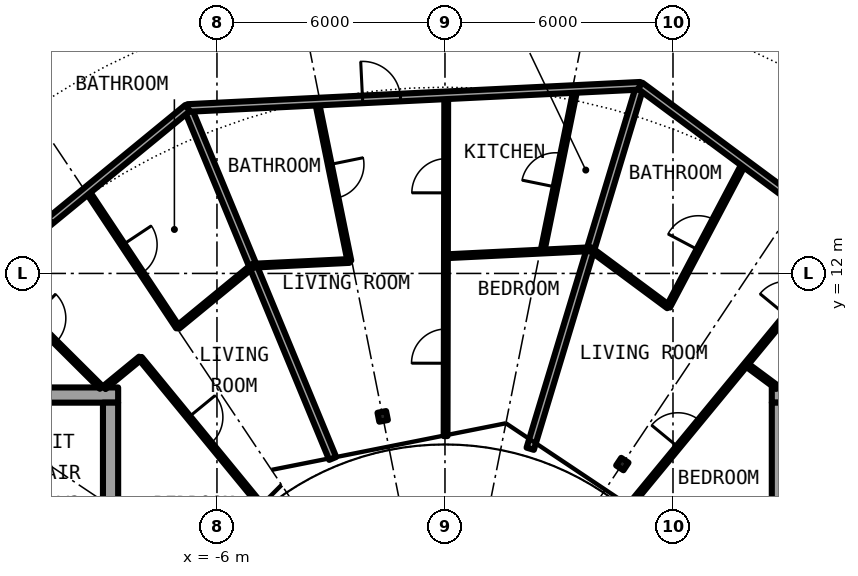
"""IFC4 building model, lengths in metres.
Left out: names, types, materials, properties, quantities, classifications, styles, units other than length and angle.
Written with IfcOpenShell. Run it as: python <this file> out.ifc"""

import sys

from ifc_helpers import new_model, si_unit, direction, frame, frame_2d, origin, origin_2d, place, context, subcontext, project, spatial, rectangle, i_section, extrude, element, fill, save


model = new_model("IFC4")
c1 = context("Model", 3, precision=1e-05, world=origin(), true_north=direction((0.0, 1.0)))
c2 = subcontext(c1, "Body", "Model", "MODEL_VIEW")
j1 = project(units=[si_unit("LENGTHUNIT", "METRE"), si_unit("PLANEANGLEUNIT", "RADIAN")], contexts=[c1])
p1 = place(None, origin())
s1 = spatial("IfcSite", under=j1, at=p1, CompositionType="ELEMENT")
p2 = place(p1, origin())
s2 = spatial("IfcBuilding", under=s1, at=p2, CompositionType="ELEMENT")
p3 = place(p2, frame((0.0, 0.0, 234.05)))
s3 = spatial("IfcBuildingStorey", under=s2, at=p3, CompositionType="ELEMENT", Elevation=234.05)
for number, where, z_axis, x_axis in (
    (1, (4.667, 6.984, 0.0), (0.0, 0.0, 1.0), (0.556, 0.831, 0.0)),
    (2, (-1.639, 8.239, 0.0), (0.0, 0.0, 1.0), (-0.195, 0.981, 0.0)),
):
    element("IfcColumn", number, at=place(p3, frame(where, z_axis=z_axis, x_axis=x_axis)), inside=s3, PredefinedType="COLUMN", context=c2, shape_type="SweptSolid", body=[
        extrude(i_section(OverallWidth=0.24, OverallDepth=0.23, WebThickness=0.008, FlangeThickness=0.012, FilletRadius=0.021, at=origin_2d()), origin(), (0.0, 0.0, 1.0), 3.05),
    ])
p4 = place(p3, frame((22.0, 8.8, 0.0), z_axis=(0.0, 0.0, 1.0), x_axis=(-1.0, 0.0, 0.0)))
e3 = element("IfcWall", 3, at=p4, inside=s3, PredefinedType="SHEAR", context=c2, shape_type="SweptSolid", body=[
    extrude(rectangle(XDim=13.4, YDim=0.4, at=frame_2d((6.7, 0.0))), origin(), (0.0, 0.0, 1.0), 3.05),
])
p5 = place(p4, frame((0.925, 0.0, 0.0)))
e4 = element("IfcOpeningElement", 4, at=p5, cuts=e3, PredefinedType="OPENING", context=c2, shape_type="SweptSolid", body=[
    extrude(rectangle(XDim=1.2, YDim=2.3, at=frame_2d((0.6, 1.15))), frame((0.0, 0.21, 0.0), z_axis=(0.0, -1.0, 0.0), x_axis=(1.0, 0.0, 0.0)), (0.0, 0.0, 1.0), 0.42),
])
p6 = place(p3, frame((8.8, -8.6, 0.0), z_axis=(0.0, 0.0, 1.0), x_axis=(0.0, 1.0, 0.0)))
e5 = element("IfcWall", 5, at=p6, inside=s3, PredefinedType="SHEAR", context=c2, shape_type="SweptSolid", body=[
    extrude(rectangle(XDim=17.2, YDim=0.4, at=frame_2d((8.6, 0.0))), origin(), (0.0, 0.0, 1.0), 3.05),
])
p7 = place(p6, frame((7.4, 0.0, 0.1)))
e6 = element("IfcOpeningElement", 6, at=p7, cuts=e5, PredefinedType="OPENING", context=c2, shape_type="SweptSolid", body=[
    extrude(rectangle(XDim=2.4, YDim=2.2, at=frame_2d((1.2, 1.1))), frame((0.0, 0.21, 0.0), z_axis=(0.0, -1.0, 0.0), x_axis=(1.0, 0.0, 0.0)), (0.0, 0.0, 1.0), 0.42),
])
p8 = place(p3, frame((-8.6, 8.8, 0.0), z_axis=(0.0, 0.0, 1.0), x_axis=(-1.0, 0.0, 0.0)))
e7 = element("IfcWall", 7, at=p8, inside=s3, PredefinedType="SHEAR", context=c2, shape_type="SweptSolid", body=[
    extrude(rectangle(XDim=13.4, YDim=0.4, at=frame_2d((6.7, 0.0))), origin(), (0.0, 0.0, 1.0), 3.05),
])
p9 = place(p8, frame((11.275, 0.0, 0.0)))
e8 = element("IfcOpeningElement", 8, at=p9, cuts=e7, PredefinedType="OPENING", context=c2, shape_type="SweptSolid", body=[
    extrude(rectangle(XDim=1.2, YDim=2.3, at=frame_2d((0.6, 1.15))), frame((0.0, 0.21, 0.0), z_axis=(0.0, -1.0, 0.0), x_axis=(1.0, 0.0, 0.0)), (0.0, 0.0, 1.0), 0.42),
])
p10 = place(p3, frame((-8.8, 8.6, 0.0), z_axis=(0.0, 0.0, 1.0), x_axis=(0.0, -1.0, 0.0)))
e9 = element("IfcWall", 9, at=p10, inside=s3, PredefinedType="SHEAR", context=c2, shape_type="SweptSolid", body=[
    extrude(rectangle(XDim=17.2, YDim=0.4, at=frame_2d((8.6, 0.0))), origin(), (0.0, 0.0, 1.0), 3.05),
])
p11 = place(p10, frame((7.4, 0.0, 0.1)))
e10 = element("IfcOpeningElement", 10, at=p11, cuts=e9, PredefinedType="OPENING", context=c2, shape_type="SweptSolid", body=[
    extrude(rectangle(XDim=2.4, YDim=2.2, at=frame_2d((1.2, 1.1))), frame((0.0, 0.21, 0.0), z_axis=(0.0, -1.0, 0.0), x_axis=(1.0, 0.0, 0.0)), (0.0, 0.0, 1.0), 0.42),
])
p12 = place(p3, frame((2.243, 7.387, 0.0), z_axis=(0.0, 0.0, 1.0), x_axis=(0.289692342235, 0.95711981844, 0.0)))
e11 = element("IfcWall", 11, at=p12, inside=s3, PredefinedType="PARTITIONING", context=c2, shape_type="SweptSolid", body=[
    extrude(rectangle(XDim=9.98, YDim=0.2, at=frame_2d((4.99, 0.0))), origin(), (0.0, 0.0, 1.0), 2.7),
])
p13 = place(p3, frame((-12.069, 12.007, 0.0), z_axis=(0.0, 0.0, 1.0), x_axis=(0.708851268309, -0.705357979622, 0.0)))
e12 = element("IfcWall", 12, at=p13, inside=s3, PredefinedType="PARTITIONING", context=c2, shape_type="SweptSolid", body=[
    extrude(rectangle(XDim=4.263, YDim=0.1, at=frame_2d((2.132, 0.0))), origin(), (0.0, 0.0, 1.0), 2.7),
])
p14 = place(p13, frame((1.682, 0.0, 0.0)))
e13 = element("IfcOpeningElement", 13, at=p14, cuts=e12, PredefinedType="OPENING", context=c2, shape_type="SweptSolid", body=[
    extrude(rectangle(XDim=0.9, YDim=2.3, at=frame_2d((0.45, 1.15))), frame((0.0, 0.06, 0.0), z_axis=(0.0, -1.0, 0.0), x_axis=(1.0, 0.0, 0.0)), (0.0, 0.0, 1.0), 0.12),
])
p15 = place(p3, frame((-9.421, 14.18, 0.0), z_axis=(0.0, 0.0, 1.0), x_axis=(0.553303732327, -0.832979579457, 0.0)))
e14 = element("IfcWall", 14, at=p15, inside=s3, PredefinedType="PARTITIONING", context=c2, shape_type="SweptSolid", body=[
    extrude(rectangle(XDim=4.319, YDim=0.1, at=frame_2d((2.16, 0.0))), origin(), (0.0, 0.0, 1.0), 2.7),
])
p16 = place(p15, frame((1.71, 0.0, 0.0)))
e15 = element("IfcOpeningElement", 15, at=p16, cuts=e14, PredefinedType="OPENING", context=c2, shape_type="SweptSolid", body=[
    extrude(rectangle(XDim=0.9, YDim=2.3, at=frame_2d((0.45, 1.15))), frame((0.0, 0.06, 0.0), z_axis=(0.0, -1.0, 0.0), x_axis=(1.0, 0.0, 0.0)), (0.0, 0.0, 1.0), 0.12),
])
p17 = place(p3, frame((-8.019, 9.771, 0.0), z_axis=(0.0, 0.0, 1.0), x_axis=(0.634401778971, -0.773003481776, 0.0)))
e16 = element("IfcWall", 16, at=p17, inside=s3, PredefinedType="PARTITIONING", context=c2, shape_type="SweptSolid", body=[
    extrude(rectangle(XDim=4.92, YDim=0.1, at=frame_2d((2.46, 0.0))), origin(), (0.0, 0.0, 1.0), 2.7),
])
p18 = place(p17, frame((2.01, 0.0, 0.0)))
e17 = element("IfcOpeningElement", 17, at=p18, cuts=e16, PredefinedType="OPENING", context=c2, shape_type="SweptSolid", body=[
    extrude(rectangle(XDim=0.9, YDim=2.3, at=frame_2d((0.45, 1.15))), frame((0.0, 0.06, 0.0), z_axis=(0.0, -1.0, 0.0), x_axis=(1.0, 0.0, 0.0)), (0.0, 0.0, 1.0), 0.12),
])
p19 = place(p3, frame((-6.773, 16.353, 0.0), z_axis=(0.0, 0.0, 1.0), x_axis=(0.382549125466, -0.923935152814, 0.0)))
e18 = element("IfcWall", 18, at=p19, inside=s3, PredefinedType="PARTITIONING", context=c2, shape_type="SweptSolid", body=[
    extrude(rectangle(XDim=9.98, YDim=0.2, at=frame_2d((4.99, 0.0))), origin(), (0.0, 0.0, 1.0), 2.7),
])
p20 = place(p3, frame((-3.37, 16.52, 0.0), z_axis=(0.0, 0.0, 1.0), x_axis=(0.199889579004, -0.979818430224, 0.0)))
e19 = element("IfcWall", 19, at=p20, inside=s3, PredefinedType="PARTITIONING", context=c2, shape_type="SweptSolid", body=[
    extrude(rectangle(XDim=4.279, YDim=0.1, at=frame_2d((2.139, 0.0))), origin(), (0.0, 0.0, 1.0), 2.7),
])
p21 = place(p20, frame((1.689, 0.0, 0.0)))
e20 = element("IfcOpeningElement", 20, at=p21, cuts=e19, PredefinedType="OPENING", context=c2, shape_type="SweptSolid", body=[
    extrude(rectangle(XDim=0.9, YDim=2.3, at=frame_2d((0.45, 1.15))), frame((0.0, 0.06, 0.0), z_axis=(0.0, -1.0, 0.0), x_axis=(1.0, 0.0, 0.0)), (0.0, 0.0, 1.0), 0.12),
])
p22 = place(p3, frame((0.016, 7.72, 0.0), z_axis=(0.0, 0.0, 1.0), x_axis=(0.001878621205, 0.99999823539, 0.0)))
e21 = element("IfcWall", 21, at=p22, inside=s3, PredefinedType="PARTITIONING", context=c2, shape_type="SweptSolid", body=[
    extrude(rectangle(XDim=8.967, YDim=0.1, at=frame_2d((4.483, 0.0))), origin(), (0.0, 0.0, 1.0), 2.7),
])
p23 = place(p22, frame((6.4, 0.0, 0.0)))
e22 = element("IfcOpeningElement", 22, at=p23, cuts=e21, PredefinedType="OPENING", context=c2, shape_type="SweptSolid", body=[
    extrude(rectangle(XDim=0.9, YDim=2.3, at=frame_2d((0.45, 1.15))), frame((0.0, 0.06, 0.0), z_axis=(0.0, -1.0, 0.0), x_axis=(1.0, 0.0, 0.0)), (0.0, 0.0, 1.0), 0.12),
])
p24 = place(p22, frame((1.917, 0.0, 0.0)))
e23 = element("IfcOpeningElement", 23, at=p24, cuts=e21, PredefinedType="OPENING", context=c2, shape_type="SweptSolid", body=[
    extrude(rectangle(XDim=0.9, YDim=2.3, at=frame_2d((0.45, 1.15))), frame((0.0, 0.06, 0.0), z_axis=(0.0, -1.0, 0.0), x_axis=(1.0, 0.0, 0.0)), (0.0, 0.0, 1.0), 0.12),
])
p25 = place(p3, frame((2.564, 12.578, 0.0), z_axis=(0.0, 0.0, 1.0), x_axis=(0.199826294126, 0.979831338637, 0.0)))
e24 = element("IfcWall", 24, at=p25, inside=s3, PredefinedType="PARTITIONING", context=c2, shape_type="SweptSolid", body=[
    extrude(rectangle(XDim=4.364, YDim=0.1, at=frame_2d((2.182, 0.0))), origin(), (0.0, 0.0, 1.0), 2.7),
])
p26 = place(p25, frame((1.732, 0.0, 0.0)))
e25 = element("IfcOpeningElement", 25, at=p26, cuts=e24, PredefinedType="OPENING", context=c2, shape_type="SweptSolid", body=[
    extrude(rectangle(XDim=0.9, YDim=2.3, at=frame_2d((0.45, 1.15))), frame((0.0, 0.06, 0.0), z_axis=(0.0, -1.0, 0.0), x_axis=(1.0, 0.0, 0.0)), (0.0, 0.0, 1.0), 0.12),
])
p27 = place(p3, frame((4.912, 5.955, 0.0), z_axis=(0.0, 0.0, 1.0), x_axis=(0.636045954217, 0.771651180342, 0.0)))
e26 = element("IfcWall", 26, at=p27, inside=s3, PredefinedType="PARTITIONING", context=c2, shape_type="SweptSolid", body=[
    extrude(rectangle(XDim=8.968, YDim=0.1, at=frame_2d((4.484, 0.0))), origin(), (0.0, 0.0, 1.0), 2.7),
])
p28 = place(p27, frame((6.401, 0.0, 0.0)))
e27 = element("IfcOpeningElement", 27, at=p28, cuts=e26, PredefinedType="OPENING", context=c2, shape_type="SweptSolid", body=[
    extrude(rectangle(XDim=0.9, YDim=2.3, at=frame_2d((0.45, 1.15))), frame((0.0, 0.06, 0.0), z_axis=(0.0, -1.0, 0.0), x_axis=(1.0, 0.0, 0.0)), (0.0, 0.0, 1.0), 0.12),
])
p29 = place(p27, frame((1.917, 0.0, 0.0)))
e28 = element("IfcOpeningElement", 28, at=p29, cuts=e26, PredefinedType="OPENING", context=c2, shape_type="SweptSolid", body=[
    extrude(rectangle(XDim=0.9, YDim=2.3, at=frame_2d((0.45, 1.15))), frame((0.0, 0.06, 0.0), z_axis=(0.0, -1.0, 0.0), x_axis=(1.0, 0.0, 0.0)), (0.0, 0.0, 1.0), 0.12),
])
p30 = place(p3, frame((5.877, 11.125, 0.0), z_axis=(0.0, 0.0, 1.0), x_axis=(0.467030118529, 0.884241408432, 0.0)))
e29 = element("IfcWall", 29, at=p30, inside=s3, PredefinedType="PARTITIONING", context=c2, shape_type="SweptSolid", body=[
    extrude(rectangle(XDim=4.278, YDim=0.1, at=frame_2d((2.139, 0.0))), origin(), (0.0, 0.0, 1.0), 2.7),
])
p31 = place(p30, frame((1.689, 0.0, 0.0)))
e30 = element("IfcOpeningElement", 30, at=p31, cuts=e29, PredefinedType="OPENING", context=c2, shape_type="SweptSolid", body=[
    extrude(rectangle(XDim=0.9, YDim=2.3, at=frame_2d((0.45, 1.15))), frame((0.0, 0.06, 0.0), z_axis=(0.0, -1.0, 0.0), x_axis=(1.0, 0.0, 0.0)), (0.0, 0.0, 1.0), 0.12),
])
p32 = place(p3, frame((-5.055, 12.204, 0.0), z_axis=(0.0, 0.0, 1.0), x_axis=(0.998814742872, 0.048673498139, 0.0)))
e31 = element("IfcWall", 31, at=p32, inside=s3, PredefinedType="PARTITIONING", context=c2, shape_type="SweptSolid", body=[
    extrude(rectangle(XDim=2.543, YDim=0.1, at=frame_2d((1.271, 0.0))), origin(), (0.0, 0.0, 1.0), 2.7),
])
p33 = place(p3, frame((0.028, 12.452, 0.0), z_axis=(0.0, 0.0, 1.0), x_axis=(0.998809918802, 0.04877239078, 0.0)))
e32 = element("IfcWall", 32, at=p33, inside=s3, PredefinedType="PARTITIONING", context=c2, shape_type="SweptSolid", body=[
    extrude(rectangle(XDim=3.814, YDim=0.1, at=frame_2d((1.907, 0.0))), origin(), (0.0, 0.0, 1.0), 2.7),
])
p34 = place(p3, frame((3.834, 12.64, 0.0), z_axis=(0.0, 0.0, 1.0), x_axis=(0.803259509791, -0.595629213463, 0.0)))
e33 = element("IfcWall", 33, at=p34, inside=s3, PredefinedType="PARTITIONING", context=c2, shape_type="SweptSolid", body=[
    extrude(rectangle(XDim=2.543, YDim=0.1, at=frame_2d((1.272, 0.0))), origin(), (0.0, 0.0, 1.0), 2.7),
])
p35 = place(p3, frame((7.919, 9.611, 0.0), z_axis=(0.0, 0.0, 1.0), x_axis=(0.80321556998, -0.595688465677, 0.0)))
e34 = element("IfcWall", 34, at=p35, inside=s3, PredefinedType="PARTITIONING", context=c2, shape_type="SweptSolid", body=[
    extrude(rectangle(XDim=1.026, YDim=0.1, at=frame_2d((0.513, 0.0))), origin(), (0.0, 0.0, 1.0), 2.7),
])
p36 = place(p3, frame((-8.963, 8.996, 0.0), z_axis=(0.0, 0.0, 1.0), x_axis=(0.772887322122, 0.63454329033, 0.0)))
e35 = element("IfcWall", 35, at=p36, inside=s3, PredefinedType="PARTITIONING", context=c2, shape_type="SweptSolid", body=[
    extrude(rectangle(XDim=1.221, YDim=0.1, at=frame_2d((0.611, 0.0))), origin(), (0.0, 0.0, 1.0), 2.7),
])
p37 = place(p3, frame((-7.032, 10.581, 0.0), z_axis=(0.0, 0.0, 1.0), x_axis=(0.772836687877, 0.634604958908, 0.0)))
e36 = element("IfcWall", 36, at=p37, inside=s3, PredefinedType="PARTITIONING", context=c2, shape_type="SweptSolid", body=[
    extrude(rectangle(XDim=2.556, YDim=0.1, at=frame_2d((1.278, 0.0))), origin(), (0.0, 0.0, 1.0), 2.7),
])
p38 = place(p3, frame((-6.774, 16.353, 0.0), z_axis=(0.0, 0.0, 1.0), x_axis=(0.998797244, 0.049031269395, 0.0)))
e37 = element("IfcWall", 37, at=p38, inside=s3, PredefinedType="PARTITIONING", context=c2, shape_type="SweptSolid", body=[
    extrude(rectangle(XDim=11.93, YDim=0.2, at=frame_2d((5.965, 0.0))), origin(), (0.0, 0.0, 1.0), 2.7),
])
p39 = place(p38, frame((4.611, 0.0, 0.0)))
e38 = element("IfcOpeningElement", 38, at=p39, cuts=e37, PredefinedType="OPENING", context=c2, shape_type="SweptSolid", body=[
    extrude(rectangle(XDim=1.0, YDim=2.3, at=frame_2d((0.5, 1.15))), frame((0.0, 0.11, 0.0), z_axis=(0.0, -1.0, 0.0), x_axis=(1.0, 0.0, 0.0)), (0.0, 0.0, 1.0), 0.22),
])
p40 = place(p3, frame((5.137, 16.938, 0.0), z_axis=(0.0, 0.0, 1.0), x_axis=(0.803229232922, -0.595670042371, 0.0)))
e39 = element("IfcWall", 39, at=p40, inside=s3, PredefinedType="PARTITIONING", context=c2, shape_type="SweptSolid", body=[
    extrude(rectangle(XDim=10.224, YDim=0.2, at=frame_2d((5.112, 0.0))), origin(), (0.0, 0.0, 1.0), 2.7),
])
p41 = place(p40, frame((4.612, 0.0, 0.0)))
e40 = element("IfcOpeningElement", 40, at=p41, cuts=e39, PredefinedType="OPENING", context=c2, shape_type="SweptSolid", body=[
    extrude(rectangle(XDim=1.0, YDim=2.3, at=frame_2d((0.5, 1.15))), frame((0.0, 0.11, 0.0), z_axis=(0.0, -1.0, 0.0), x_axis=(1.0, 0.0, 0.0)), (0.0, 0.0, 1.0), 0.22),
])
p42 = place(p3, frame((-14.717, 9.834, 0.0), z_axis=(0.0, 0.0, 1.0), x_axis=(0.773034536097, 0.634363938131, 0.0)))
e41 = element("IfcWall", 41, at=p42, inside=s3, PredefinedType="PARTITIONING", context=c2, shape_type="SweptSolid", body=[
    extrude(rectangle(XDim=10.277, YDim=0.2, at=frame_2d((5.138, 0.0))), origin(), (0.0, 0.0, 1.0), 2.7),
])
p43 = place(p42, frame((4.638, 0.0, 0.0)))
e42 = element("IfcOpeningElement", 42, at=p43, cuts=e41, PredefinedType="OPENING", context=c2, shape_type="SweptSolid", body=[
    extrude(rectangle(XDim=1.0, YDim=2.3, at=frame_2d((0.5, 1.15))), frame((0.0, 0.11, 0.0), z_axis=(0.0, -1.0, 0.0), x_axis=(1.0, 0.0, 0.0)), (0.0, 0.0, 1.0), 0.22),
])
p44 = place(p3, frame((-14.149, 17.236, 0.0), z_axis=(0.0, 0.0, 1.0), x_axis=(0.881869539497, 0.471493494448, 0.0)))
e43 = element("IfcWall", 43, at=p44, inside=s3, PredefinedType="PARTITIONING", context=c2, shape_type="SweptSolid", body=[
    extrude(rectangle(XDim=8.704, YDim=0.2, at=frame_2d((4.352, 0.0))), origin(), (0.0, 0.0, 1.0), 2.7),
])
p45 = place(p44, frame((2.765, 0.0, 0.0)))
e44 = element("IfcOpeningElement", 44, at=p45, cuts=e43, PredefinedType="OPENING", context=c2, shape_type="SweptSolid", body=[
    extrude(rectangle(XDim=1.0, YDim=2.3, at=frame_2d((0.5, 1.15))), frame((0.0, 0.11, 0.0), z_axis=(0.0, -1.0, 0.0), x_axis=(1.0, 0.0, 0.0)), (0.0, 0.0, 1.0), 0.22),
])
p46 = place(p31, origin())
e45 = element("IfcDoor", 45, at=p46, inside=s3, OperationType="SINGLE_SWING_RIGHT", PredefinedType="DOOR", context=c2, shape_type="SweptSolid", body=[
    extrude(rectangle(XDim=0.9, YDim=2.3, at=frame_2d((0.45, 1.15))), frame((0.0, 0.025, 0.0), z_axis=(0.0, -1.0, 0.0), x_axis=(1.0, 0.0, 0.0)), (0.0, 0.0, 1.0), 0.05),
])
fill(e30, e45)
p47 = place(p29, origin())
e46 = element("IfcDoor", 46, at=p47, inside=s3, OperationType="SINGLE_SWING_LEFT", PredefinedType="DOOR", context=c2, shape_type="SweptSolid", body=[
    extrude(rectangle(XDim=0.9, YDim=2.3, at=frame_2d((0.45, 1.15))), frame((0.0, 0.025, 0.0), z_axis=(0.0, -1.0, 0.0), x_axis=(1.0, 0.0, 0.0)), (0.0, 0.0, 1.0), 0.05),
])
fill(e28, e46)
p48 = place(p39, origin())
e47 = element("IfcDoor", 47, at=p48, inside=s3, OperationType="SINGLE_SWING_LEFT", PredefinedType="DOOR", context=c2, shape_type="SweptSolid", body=[
    extrude(rectangle(XDim=1.0, YDim=2.3, at=frame_2d((0.5, 1.15))), frame((0.0, 0.025, 0.0), z_axis=(0.0, -1.0, 0.0), x_axis=(1.0, 0.0, 0.0)), (0.0, 0.0, 1.0), 0.05),
])
fill(e38, e47)
p49 = place(p21, origin())
e48 = element("IfcDoor", 48, at=p49, inside=s3, OperationType="SINGLE_SWING_RIGHT", PredefinedType="DOOR", context=c2, shape_type="SweptSolid", body=[
    extrude(rectangle(XDim=0.9, YDim=2.3, at=frame_2d((0.45, 1.15))), frame((0.0, 0.025, 0.0), z_axis=(0.0, -1.0, 0.0), x_axis=(1.0, 0.0, 0.0)), (0.0, 0.0, 1.0), 0.05),
])
fill(e20, e48)
p50 = place(p23, origin())
e49 = element("IfcDoor", 49, at=p50, inside=s3, OperationType="SINGLE_SWING_RIGHT", PredefinedType="DOOR", context=c2, shape_type="SweptSolid", body=[
    extrude(rectangle(XDim=0.9, YDim=2.3, at=frame_2d((0.45, 1.15))), frame((0.0, 0.025, 0.0), z_axis=(0.0, -1.0, 0.0), x_axis=(1.0, 0.0, 0.0)), (0.0, 0.0, 1.0), 0.05),
])
fill(e22, e49)
p51 = place(p26, origin())
e50 = element("IfcDoor", 50, at=p51, inside=s3, OperationType="SINGLE_SWING_RIGHT", PredefinedType="DOOR", context=c2, shape_type="SweptSolid", body=[
    extrude(rectangle(XDim=0.9, YDim=2.3, at=frame_2d((0.45, 1.15))), frame((0.0, 0.025, 0.0), z_axis=(0.0, -1.0, 0.0), x_axis=(1.0, 0.0, 0.0)), (0.0, 0.0, 1.0), 0.05),
])
fill(e25, e50)
p52 = place(p24, origin())
e51 = element("IfcDoor", 51, at=p52, inside=s3, OperationType="SINGLE_SWING_LEFT", PredefinedType="DOOR", context=c2, shape_type="SweptSolid", body=[
    extrude(rectangle(XDim=0.9, YDim=2.3, at=frame_2d((0.45, 1.15))), frame((0.0, 0.025, 0.0), z_axis=(0.0, -1.0, 0.0), x_axis=(1.0, 0.0, 0.0)), (0.0, 0.0, 1.0), 0.05),
])
fill(e23, e51)
p53 = place(p16, origin())
e52 = element("IfcDoor", 52, at=p53, inside=s3, OperationType="SINGLE_SWING_RIGHT", PredefinedType="DOOR", context=c2, shape_type="SweptSolid", body=[
    extrude(rectangle(XDim=0.9, YDim=2.3, at=frame_2d((0.45, 1.15))), frame((0.0, 0.025, 0.0), z_axis=(0.0, -1.0, 0.0), x_axis=(1.0, 0.0, 0.0)), (0.0, 0.0, 1.0), 0.05),
])
fill(e15, e52)
p54 = place(p14, origin())
e53 = element("IfcDoor", 53, at=p54, inside=s3, OperationType="SINGLE_SWING_RIGHT", PredefinedType="DOOR", context=c2, shape_type="SweptSolid", body=[
    extrude(rectangle(XDim=0.9, YDim=2.3, at=frame_2d((0.45, 1.15))), frame((0.0, 0.025, 0.0), z_axis=(0.0, -1.0, 0.0), x_axis=(1.0, 0.0, 0.0)), (0.0, 0.0, 1.0), 0.05),
])
fill(e13, e53)
p55 = place(p18, origin())
e54 = element("IfcDoor", 54, at=p55, inside=s3, OperationType="SINGLE_SWING_RIGHT", PredefinedType="DOOR", context=c2, shape_type="SweptSolid", body=[
    extrude(rectangle(XDim=0.9, YDim=2.3, at=frame_2d((0.45, 1.15))), frame((0.0, 0.025, 0.0), z_axis=(0.0, -1.0, 0.0), x_axis=(1.0, 0.0, 0.0)), (0.0, 0.0, 1.0), 0.05),
])
fill(e17, e54)
save(model, sys.argv[1])
